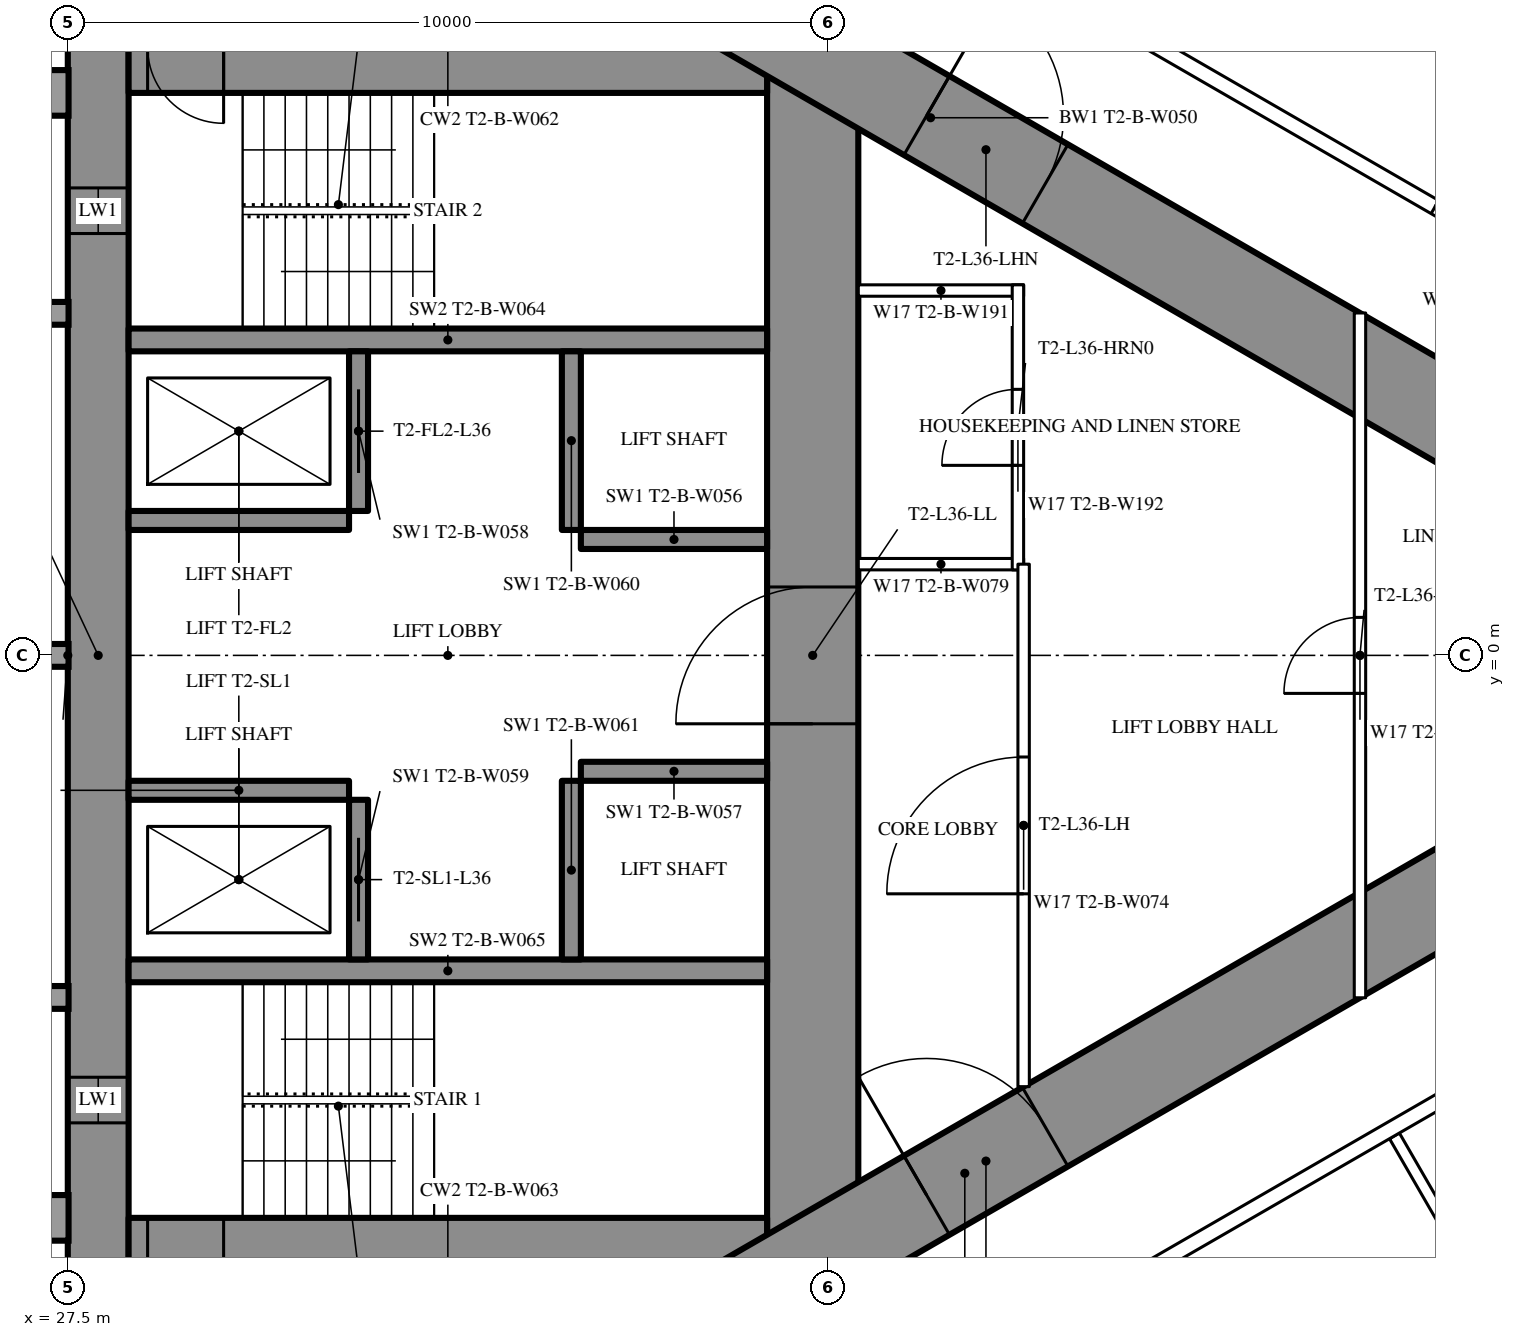
"""IFC4 building model, lengths in metres.
Left out: names, types, materials, properties, quantities, classifications, styles, units other than length and angle.
Written with IfcOpenShell. Run it as: python <this file> out.ifc"""

import sys

from ifc_helpers import new_model, si_unit, direction, frame, frame_2d, origin, place, context, subcontext, project, spatial, rectangle, extrude, element, fill, save


model = new_model("IFC4")
c1 = context("Model", 3, precision=1e-05, world=origin(), true_north=direction((0.0, 1.0)))
c2 = subcontext(c1, "Body", "Model", "MODEL_VIEW")
j1 = project(units=[si_unit("LENGTHUNIT", "METRE"), si_unit("PLANEANGLEUNIT", "RADIAN")], contexts=[c1])
p1 = place(None, origin())
s1 = spatial("IfcSite", under=j1, at=p1, CompositionType="ELEMENT")
p2 = place(p1, origin())
s2 = spatial("IfcBuilding", under=s1, at=p2, CompositionType="ELEMENT")
p3 = place(p2, frame((0.0, 0.0, 136.1)))
s3 = spatial("IfcBuildingStorey", under=s2, at=p3, CompositionType="ELEMENT", Elevation=136.1)
p4 = place(p3, frame((27.9, -8.6, 0.0), z_axis=(0.0, 0.0, 1.0), x_axis=(0.0, 1.0, 0.0)))
e1 = element("IfcWall", 1, at=p4, inside=s3, PredefinedType="SHEAR", context=c2, shape_type="SweptSolid", body=[
    extrude(rectangle(XDim=17.2, YDim=0.8, at=frame_2d((8.6, 0.0))), origin(), (0.0, 0.0, 1.0), 3.5),
])
p5 = place(p4, frame((2.45, 0.0, 0.6)))
e2 = element("IfcOpeningElement", 2, at=p5, cuts=e1, PredefinedType="OPENING", context=c2, shape_type="SweptSolid", body=[
    extrude(rectangle(XDim=0.6, YDim=2.1, at=frame_2d((0.3, 1.05))), frame((0.0, 0.41, 0.0), z_axis=(0.0, -1.0, 0.0), x_axis=(1.0, 0.0, 0.0)), (0.0, 0.0, 1.0), 0.82),
])
p6 = place(p4, frame((14.15, 0.0, 0.6)))
e3 = element("IfcOpeningElement", 3, at=p6, cuts=e1, PredefinedType="OPENING", context=c2, shape_type="SweptSolid", body=[
    extrude(rectangle(XDim=0.6, YDim=2.1, at=frame_2d((0.3, 1.05))), frame((0.0, 0.41, 0.0), z_axis=(0.0, -1.0, 0.0), x_axis=(1.0, 0.0, 0.0)), (0.0, 0.0, 1.0), 0.82),
])
p7 = place(p3, frame((37.3, -8.6, 0.0), z_axis=(0.0, 0.0, 1.0), x_axis=(0.0, 1.0, 0.0)))
e4 = element("IfcWall", 4, at=p7, inside=s3, PredefinedType="SHEAR", context=c2, shape_type="SweptSolid", body=[
    extrude(rectangle(XDim=17.2, YDim=1.2, at=frame_2d((8.6, 0.0))), origin(), (0.0, 0.0, 1.0), 3.5),
])
p8 = place(p7, frame((7.7, 0.0, 0.0)))
e5 = element("IfcOpeningElement", 5, at=p8, cuts=e4, PredefinedType="OPENING", context=c2, shape_type="SweptSolid", body=[
    extrude(rectangle(XDim=1.8, YDim=2.2, at=frame_2d((0.9, 1.1))), frame((0.0, 0.61, 0.0), z_axis=(0.0, -1.0, 0.0), x_axis=(1.0, 0.0, 0.0)), (0.0, 0.0, 1.0), 1.22),
])
p9 = place(p3, frame((28.3, -8.0, 0.0), z_axis=(0.0, 0.0, 1.0), x_axis=(1.0, 0.0, 0.0)))
e6 = element("IfcWall", 6, at=p9, inside=s3, PredefinedType="SHEAR", context=c2, shape_type="SweptSolid", body=[
    extrude(rectangle(XDim=8.4, YDim=1.2, at=frame_2d((4.2, 0.0))), origin(), (0.0, 0.0, 1.0), 3.5),
])
p10 = place(p9, frame((0.25, 0.0, 0.0)))
e7 = element("IfcOpeningElement", 7, at=p10, cuts=e6, PredefinedType="OPENING", context=c2, shape_type="SweptSolid", body=[
    extrude(rectangle(XDim=1.0, YDim=2.2, at=frame_2d((0.5, 1.1))), frame((0.0, 0.61, 0.0), z_axis=(0.0, -1.0, 0.0), x_axis=(1.0, 0.0, 0.0)), (0.0, 0.0, 1.0), 1.22),
])
p11 = place(p3, frame((28.3, 8.0, 0.0), z_axis=(0.0, 0.0, 1.0), x_axis=(1.0, 0.0, 0.0)))
e8 = element("IfcWall", 8, at=p11, inside=s3, PredefinedType="SHEAR", context=c2, shape_type="SweptSolid", body=[
    extrude(rectangle(XDim=8.4, YDim=1.2, at=frame_2d((4.2, 0.0))), origin(), (0.0, 0.0, 1.0), 3.5),
])
p12 = place(p11, frame((0.25, 0.0, 0.0)))
e9 = element("IfcOpeningElement", 9, at=p12, cuts=e8, PredefinedType="OPENING", context=c2, shape_type="SweptSolid", body=[
    extrude(rectangle(XDim=1.0, YDim=2.2, at=frame_2d((0.5, 1.1))), frame((0.0, 0.61, 0.0), z_axis=(0.0, -1.0, 0.0), x_axis=(1.0, 0.0, 0.0)), (0.0, 0.0, 1.0), 1.22),
])
for number, where, z_axis, x_axis in (
    (10, (28.3, -4.15, 0.0), (0.0, 0.0, 1.0), (1.0, 0.0, 0.0)),
    (11, (28.3, 4.15, 0.0), (0.0, 0.0, 1.0), (1.0, 0.0, 0.0)),
):
    element("IfcWall", number, at=place(p3, frame(where, z_axis=z_axis, x_axis=x_axis)), inside=s3, PredefinedType="SHEAR", context=c2, shape_type="SweptSolid", body=[
        extrude(rectangle(XDim=8.4, YDim=0.3, at=frame_2d((4.2, 0.0))), origin(), (0.0, 0.0, 1.0), 3.5),
    ])
p13 = place(p3, frame((31.325, -4.0, 0.0), z_axis=(0.0, 0.0, 1.0), x_axis=(0.0, 1.0, 0.0)))
e12 = element("IfcWall", 12, at=p13, inside=s3, PredefinedType="SHEAR", context=c2, shape_type="SweptSolid", body=[
    extrude(rectangle(XDim=2.1, YDim=0.25, at=frame_2d((1.05, 0.0))), origin(), (0.0, 0.0, 1.0), 3.5),
])
p14 = place(p13, frame((0.5, 0.0, 0.0)))
e13 = element("IfcOpeningElement", 13, at=p14, cuts=e12, PredefinedType="OPENING", context=c2, shape_type="SweptSolid", body=[
    extrude(rectangle(XDim=1.1, YDim=2.2, at=frame_2d((0.55, 1.1))), frame((0.0, 0.135, 0.0), z_axis=(0.0, -1.0, 0.0), x_axis=(1.0, 0.0, 0.0)), (0.0, 0.0, 1.0), 0.27),
])
p15 = place(p3, frame((34.125, -4.0, 0.0), z_axis=(0.0, 0.0, 1.0), x_axis=(0.0, 1.0, 0.0)))
e14 = element("IfcWall", 14, at=p15, inside=s3, PredefinedType="SHEAR", context=c2, shape_type="SweptSolid", body=[
    extrude(rectangle(XDim=2.35, YDim=0.25, at=frame_2d((1.175, 0.0))), origin(), (0.0, 0.0, 1.0), 3.5),
])
p16 = place(p3, frame((28.3, -1.775, 0.0), z_axis=(0.0, 0.0, 1.0), x_axis=(1.0, 0.0, 0.0)))
e15 = element("IfcWall", 15, at=p16, inside=s3, PredefinedType="SHEAR", context=c2, shape_type="SweptSolid", body=[
    extrude(rectangle(XDim=2.9, YDim=0.25, at=frame_2d((1.45, 0.0))), origin(), (0.0, 0.0, 1.0), 3.5),
])
p17 = place(p3, frame((34.25, -1.525, 0.0), z_axis=(0.0, 0.0, 1.0), x_axis=(1.0, 0.0, 0.0)))
e16 = element("IfcWall", 16, at=p17, inside=s3, PredefinedType="SHEAR", context=c2, shape_type="SweptSolid", body=[
    extrude(rectangle(XDim=2.45, YDim=0.25, at=frame_2d((1.225, 0.0))), origin(), (0.0, 0.0, 1.0), 3.5),
])
p18 = place(p3, frame((31.325, 1.9, 0.0), z_axis=(0.0, 0.0, 1.0), x_axis=(0.0, 1.0, 0.0)))
e17 = element("IfcWall", 17, at=p18, inside=s3, PredefinedType="SHEAR", context=c2, shape_type="SweptSolid", body=[
    extrude(rectangle(XDim=2.1, YDim=0.25, at=frame_2d((1.05, 0.0))), origin(), (0.0, 0.0, 1.0), 3.5),
])
p19 = place(p18, frame((0.5, 0.0, 0.0)))
e18 = element("IfcOpeningElement", 18, at=p19, cuts=e17, PredefinedType="OPENING", context=c2, shape_type="SweptSolid", body=[
    extrude(rectangle(XDim=1.1, YDim=2.2, at=frame_2d((0.55, 1.1))), frame((0.0, 0.135, 0.0), z_axis=(0.0, -1.0, 0.0), x_axis=(1.0, 0.0, 0.0)), (0.0, 0.0, 1.0), 0.27),
])
p20 = place(p3, frame((34.125, 1.65, 0.0), z_axis=(0.0, 0.0, 1.0), x_axis=(0.0, 1.0, 0.0)))
e19 = element("IfcWall", 19, at=p20, inside=s3, PredefinedType="SHEAR", context=c2, shape_type="SweptSolid", body=[
    extrude(rectangle(XDim=2.35, YDim=0.25, at=frame_2d((1.175, 0.0))), origin(), (0.0, 0.0, 1.0), 3.5),
])
p21 = place(p3, frame((28.3, 1.775, 0.0), z_axis=(0.0, 0.0, 1.0), x_axis=(1.0, 0.0, 0.0)))
e20 = element("IfcWall", 20, at=p21, inside=s3, PredefinedType="SHEAR", context=c2, shape_type="SweptSolid", body=[
    extrude(rectangle(XDim=2.9, YDim=0.25, at=frame_2d((1.45, 0.0))), origin(), (0.0, 0.0, 1.0), 3.5),
])
p22 = place(p3, frame((34.25, 1.525, 0.0), z_axis=(0.0, 0.0, 1.0), x_axis=(1.0, 0.0, 0.0)))
e21 = element("IfcWall", 21, at=p22, inside=s3, PredefinedType="SHEAR", context=c2, shape_type="SweptSolid", body=[
    extrude(rectangle(XDim=2.45, YDim=0.25, at=frame_2d((1.225, 0.0))), origin(), (0.0, 0.0, 1.0), 3.5),
])
p23 = place(p3, frame((27.2, -13.8, 0.0), z_axis=(0.0, 0.0, 1.0), x_axis=(0.866027159892, 0.499996958321, 0.0)))
e22 = element("IfcWall", 22, at=p23, inside=s3, PredefinedType="SHEAR", context=c2, shape_type="SweptSolid", body=[
    extrude(rectangle(XDim=27.947, YDim=1.2, at=frame_2d((13.973, 0.0))), origin(), (0.0, 0.0, 1.0), 3.5),
])
p24 = place(p23, frame((4.6, 0.0, 0.0)))
e23 = element("IfcOpeningElement", 23, at=p24, cuts=e22, PredefinedType="OPENING", context=c2, shape_type="SweptSolid", body=[
    extrude(rectangle(XDim=1.0, YDim=2.2, at=frame_2d((0.5, 1.1))), frame((0.0, 0.61, 0.0), z_axis=(0.0, -1.0, 0.0), x_axis=(1.0, 0.0, 0.0)), (0.0, 0.0, 1.0), 1.22),
])
p25 = place(p23, frame((13.395, 0.0, 0.0)))
e24 = element("IfcOpeningElement", 24, at=p25, cuts=e22, PredefinedType="OPENING", context=c2, shape_type="SweptSolid", body=[
    extrude(rectangle(XDim=1.8, YDim=2.2, at=frame_2d((0.9, 1.1))), frame((0.0, 0.61, 0.0), z_axis=(0.0, -1.0, 0.0), x_axis=(1.0, 0.0, 0.0)), (0.0, 0.0, 1.0), 1.22),
])
p26 = place(p3, frame((27.2, 13.8, 0.0), z_axis=(0.0, 0.0, 1.0), x_axis=(0.866024515034, -0.500001539357, 0.0)))
e25 = element("IfcWall", 25, at=p26, inside=s3, PredefinedType="SHEAR", context=c2, shape_type="SweptSolid", body=[
    extrude(rectangle(XDim=26.907, YDim=1.2, at=frame_2d((13.454, 0.0))), origin(), (0.0, 0.0, 1.0), 3.5),
])
p27 = place(p26, frame((4.6, 0.0, 0.0)))
e26 = element("IfcOpeningElement", 26, at=p27, cuts=e25, PredefinedType="OPENING", context=c2, shape_type="SweptSolid", body=[
    extrude(rectangle(XDim=1.0, YDim=2.2, at=frame_2d((0.5, 1.1))), frame((0.0, 0.61, 0.0), z_axis=(0.0, -1.0, 0.0), x_axis=(1.0, 0.0, 0.0)), (0.0, 0.0, 1.0), 1.22),
])
p28 = place(p26, frame((13.395, 0.0, 0.0)))
e27 = element("IfcOpeningElement", 27, at=p28, cuts=e25, PredefinedType="OPENING", context=c2, shape_type="SweptSolid", body=[
    extrude(rectangle(XDim=1.8, YDim=2.2, at=frame_2d((0.9, 1.1))), frame((0.0, 0.61, 0.0), z_axis=(0.0, -1.0, 0.0), x_axis=(1.0, 0.0, 0.0)), (0.0, 0.0, 1.0), 1.22),
])
p29 = place(p3, frame((44.954, -6.321, 0.0), z_axis=(0.0, 0.0, 1.0), x_axis=(0.500018676722, -0.866014620505, 0.0)))
e28 = element("IfcWall", 28, at=p29, inside=s3, PredefinedType="PARTITIONING", context=c2, shape_type="SweptSolid", body=[
    extrude(rectangle(XDim=8.704, YDim=0.15, at=frame_2d((4.352, 0.0))), origin(), (0.0, 0.0, 1.0), 2.2),
])
p30 = place(p3, frame((37.96, -10.243, 0.0), z_axis=(0.0, 0.0, 1.0), x_axis=(0.866026429433, 0.499998223521, 0.0)))
e29 = element("IfcWall", 29, at=p30, inside=s3, PredefinedType="PARTITIONING", context=c2, shape_type="SweptSolid", body=[
    extrude(rectangle(XDim=20.487, YDim=0.2, at=frame_2d((10.243, 0.0))), origin(), (0.0, 0.0, 1.0), 3.25),
])
p31 = place(p30, frame((10.743, 0.0, 0.0)))
e30 = element("IfcOpeningElement", 30, at=p31, cuts=e29, PredefinedType="OPENING", context=c2, shape_type="SweptSolid", body=[
    extrude(rectangle(XDim=0.95, YDim=2.2, at=frame_2d((0.475, 1.1))), frame((0.0, 0.11, 0.0), z_axis=(0.0, -1.0, 0.0), x_axis=(1.0, 0.0, 0.0)), (0.0, 0.0, 1.0), 0.22),
])
p32 = place(p30, frame((17.586, 0.0, 0.0)))
e31 = element("IfcOpeningElement", 31, at=p32, cuts=e29, PredefinedType="OPENING", context=c2, shape_type="SweptSolid", body=[
    extrude(rectangle(XDim=1.8, YDim=2.2, at=frame_2d((0.9, 1.1))), frame((0.0, 0.11, 0.0), z_axis=(0.0, -1.0, 0.0), x_axis=(1.0, 0.0, 0.0)), (0.0, 0.0, 1.0), 0.22),
])
p33 = place(p30, frame((0.6, 0.0, 0.0)))
e32 = element("IfcOpeningElement", 32, at=p33, cuts=e29, PredefinedType="OPENING", context=c2, shape_type="SweptSolid", body=[
    extrude(rectangle(XDim=0.95, YDim=2.2, at=frame_2d((0.475, 1.1))), frame((0.0, 0.11, 0.0), z_axis=(0.0, -1.0, 0.0), x_axis=(1.0, 0.0, 0.0)), (0.0, 0.0, 1.0), 0.22),
])
p34 = place(p3, frame((36.834, 10.894, 0.0), z_axis=(0.0, 0.0, 1.0), x_axis=(0.866028157229, -0.499995230863, 0.0)))
e33 = element("IfcWall", 33, at=p34, inside=s3, PredefinedType="PARTITIONING", context=c2, shape_type="SweptSolid", body=[
    extrude(rectangle(XDim=21.667, YDim=0.2, at=frame_2d((10.833, 0.0))), origin(), (0.0, 0.0, 1.0), 3.25),
])
p35 = place(p34, frame((20.117, 0.0, 0.0)))
e34 = element("IfcOpeningElement", 34, at=p35, cuts=e33, PredefinedType="OPENING", context=c2, shape_type="SweptSolid", body=[
    extrude(rectangle(XDim=0.95, YDim=2.2, at=frame_2d((0.475, 1.1))), frame((0.0, 0.11, 0.0), z_axis=(0.0, -1.0, 0.0), x_axis=(1.0, 0.0, 0.0)), (0.0, 0.0, 1.0), 0.22),
])
p36 = place(p34, frame((14.938, 0.0, 0.0)))
e35 = element("IfcOpeningElement", 35, at=p36, cuts=e33, PredefinedType="OPENING", context=c2, shape_type="SweptSolid", body=[
    extrude(rectangle(XDim=1.8, YDim=2.2, at=frame_2d((0.9, 1.1))), frame((0.0, 0.11, 0.0), z_axis=(0.0, -1.0, 0.0), x_axis=(1.0, 0.0, 0.0)), (0.0, 0.0, 1.0), 0.22),
])
p37 = place(p34, frame((9.99, 0.0, 0.0)))
e36 = element("IfcOpeningElement", 36, at=p37, cuts=e33, PredefinedType="OPENING", context=c2, shape_type="SweptSolid", body=[
    extrude(rectangle(XDim=0.95, YDim=2.2, at=frame_2d((0.475, 1.1))), frame((0.0, 0.11, 0.0), z_axis=(0.0, -1.0, 0.0), x_axis=(1.0, 0.0, 0.0)), (0.0, 0.0, 1.0), 0.22),
])
p38 = place(p34, frame((3.35, 0.0, 0.0)))
e37 = element("IfcOpeningElement", 37, at=p38, cuts=e33, PredefinedType="OPENING", context=c2, shape_type="SweptSolid", body=[
    extrude(rectangle(XDim=1.0, YDim=2.2, at=frame_2d((0.5, 1.1))), frame((0.0, 0.11, 0.0), z_axis=(0.0, -1.0, 0.0), x_axis=(1.0, 0.0, 0.0)), (0.0, 0.0, 1.0), 0.22),
])
for number, where, z_axis, x_axis in (
    (38, (37.9, 1.2, 0.0), (0.0, 0.0, 1.0), (1.0, 0.0, 0.0)),
    (39, (37.9, 4.8, 0.0), (0.0, 0.0, 1.0), (1.0, 0.0, 0.0)),
):
    element("IfcWall", number, at=place(p3, frame(where, z_axis=z_axis, x_axis=x_axis)), inside=s3, PredefinedType="PARTITIONING", context=c2, shape_type="SweptSolid", body=[
        extrude(rectangle(XDim=2.175, YDim=0.15, at=frame_2d((1.087, 0.0))), origin(), (0.0, 0.0, 1.0), 3.25),
    ])
p39 = place(p3, frame((40.0, 1.125, 0.0), z_axis=(0.0, 0.0, 1.0), x_axis=(0.0, 1.0, 0.0)))
e40 = element("IfcWall", 40, at=p39, inside=s3, PredefinedType="PARTITIONING", context=c2, shape_type="SweptSolid", body=[
    extrude(rectangle(XDim=3.75, YDim=0.15, at=frame_2d((1.875, 0.0))), origin(), (0.0, 0.0, 1.0), 3.25),
])
p40 = place(p39, frame((1.375, 0.0, 0.0)))
e41 = element("IfcOpeningElement", 41, at=p40, cuts=e40, PredefinedType="OPENING", context=c2, shape_type="SweptSolid", body=[
    extrude(rectangle(XDim=1.0, YDim=2.2, at=frame_2d((0.5, 1.1))), frame((0.0, 0.085, 0.0), z_axis=(0.0, -1.0, 0.0), x_axis=(1.0, 0.0, 0.0)), (0.0, 0.0, 1.0), 0.17),
])
p41 = place(p3, frame((40.075, -5.674, 0.0), z_axis=(0.0, 0.0, 1.0), x_axis=(0.0, 1.0, 0.0)))
e42 = element("IfcWall", 42, at=p41, inside=s3, PredefinedType="PARTITIONING", context=c2, shape_type="SweptSolid", body=[
    extrude(rectangle(XDim=6.874, YDim=0.15, at=frame_2d((3.437, 0.0))), origin(), (0.0, 0.0, 1.0), 3.25),
])
p42 = place(p41, frame((2.537, 0.0, 0.0)))
e43 = element("IfcOpeningElement", 43, at=p42, cuts=e42, PredefinedType="OPENING", context=c2, shape_type="SweptSolid", body=[
    extrude(rectangle(XDim=1.8, YDim=2.2, at=frame_2d((0.9, 1.1))), frame((0.0, 0.085, 0.0), z_axis=(0.0, -1.0, 0.0), x_axis=(1.0, 0.0, 0.0)), (0.0, 0.0, 1.0), 0.17),
])
p43 = place(p3, frame((44.5, -4.505, 0.0), z_axis=(0.0, 0.0, 1.0), x_axis=(0.0, 1.0, 0.0)))
e44 = element("IfcWall", 44, at=p43, inside=s3, PredefinedType="PARTITIONING", context=c2, shape_type="SweptSolid", body=[
    extrude(rectangle(XDim=9.009, YDim=0.15, at=frame_2d((4.505, 0.0))), origin(), (0.0, 0.0, 1.0), 2.45),
])
p44 = place(p43, frame((4.005, 0.0, 0.0)))
e45 = element("IfcOpeningElement", 45, at=p44, cuts=e44, PredefinedType="OPENING", context=c2, shape_type="SweptSolid", body=[
    extrude(rectangle(XDim=1.0, YDim=2.2, at=frame_2d((0.5, 1.1))), frame((0.0, 0.085, 0.0), z_axis=(0.0, -1.0, 0.0), x_axis=(1.0, 0.0, 0.0)), (0.0, 0.0, 1.0), 0.17),
])
p45 = place(p37, origin())
e46 = element("IfcDoor", 46, at=p45, inside=s3, OperationType="SINGLE_SWING_LEFT", PredefinedType="DOOR", context=c2, shape_type="SweptSolid", body=[
    extrude(rectangle(XDim=0.95, YDim=2.2, at=frame_2d((0.475, 1.1))), frame((0.0, 0.025, 0.0), z_axis=(0.0, -1.0, 0.0), x_axis=(1.0, 0.0, 0.0)), (0.0, 0.0, 1.0), 0.05),
])
fill(e36, e46)
p46 = place(p40, origin())
e47 = element("IfcDoor", 47, at=p46, inside=s3, OperationType="SINGLE_SWING_LEFT", PredefinedType="DOOR", context=c2, shape_type="SweptSolid", body=[
    extrude(rectangle(XDim=1.0, YDim=2.2, at=frame_2d((0.5, 1.1))), frame((0.0, 0.025, 0.0), z_axis=(0.0, -1.0, 0.0), x_axis=(1.0, 0.0, 0.0)), (0.0, 0.0, 1.0), 0.05),
])
fill(e41, e47)
p47 = place(p42, origin())
e48 = element("IfcDoor", 48, at=p47, inside=s3, OperationType="DOUBLE_DOOR_SINGLE_SWING", PredefinedType="DOOR", context=c2, shape_type="SweptSolid", body=[
    extrude(rectangle(XDim=1.8, YDim=2.2, at=frame_2d((0.9, 1.1))), frame((0.0, 0.025, 0.0), z_axis=(0.0, -1.0, 0.0), x_axis=(1.0, 0.0, 0.0)), (0.0, 0.0, 1.0), 0.05),
])
fill(e43, e48)
p48 = place(p44, origin())
e49 = element("IfcDoor", 49, at=p48, inside=s3, OperationType="SINGLE_SWING_LEFT", PredefinedType="DOOR", context=c2, shape_type="SweptSolid", body=[
    extrude(rectangle(XDim=1.0, YDim=2.2, at=frame_2d((0.5, 1.1))), frame((0.0, 0.025, 0.0), z_axis=(0.0, -1.0, 0.0), x_axis=(1.0, 0.0, 0.0)), (0.0, 0.0, 1.0), 0.05),
])
fill(e45, e49)
p49 = place(p25, origin())
e50 = element("IfcDoor", 50, at=p49, inside=s3, OperationType="DOUBLE_DOOR_SINGLE_SWING", PredefinedType="DOOR", context=c2, shape_type="SweptSolid", body=[
    extrude(rectangle(XDim=1.8, YDim=2.2, at=frame_2d((0.9, 1.1))), frame((0.0, 0.025, 0.0), z_axis=(0.0, -1.0, 0.0), x_axis=(1.0, 0.0, 0.0)), (0.0, 0.0, 1.0), 0.05),
])
fill(e24, e50)
p50 = place(p28, origin())
e51 = element("IfcDoor", 51, at=p50, inside=s3, OperationType="DOUBLE_DOOR_SINGLE_SWING", PredefinedType="DOOR", context=c2, shape_type="SweptSolid", body=[
    extrude(rectangle(XDim=1.8, YDim=2.2, at=frame_2d((0.9, 1.1))), frame((0.0, 0.025, 0.0), z_axis=(0.0, -1.0, 0.0), x_axis=(1.0, 0.0, 0.0)), (0.0, 0.0, 1.0), 0.05),
])
fill(e27, e51)
p51 = place(p8, origin())
e52 = element("IfcDoor", 52, at=p51, inside=s3, OperationType="DOUBLE_DOOR_SINGLE_SWING", PredefinedType="DOOR", context=c2, shape_type="SweptSolid", body=[
    extrude(rectangle(XDim=1.8, YDim=2.2, at=frame_2d((0.9, 1.1))), frame((0.0, 0.025, 0.0), z_axis=(0.0, -1.0, 0.0), x_axis=(1.0, 0.0, 0.0)), (0.0, 0.0, 1.0), 0.05),
])
fill(e5, e52)
p52 = place(p14, origin())
e53 = element("IfcDoor", 53, at=p52, inside=s3, OperationType="SLIDING_TO_LEFT", PredefinedType="USERDEFINED", context=c2, shape_type="SweptSolid", body=[
    extrude(rectangle(XDim=1.1, YDim=2.2, at=frame_2d((0.55, 1.1))), frame((0.0, 0.025, 0.0), z_axis=(0.0, -1.0, 0.0), x_axis=(1.0, 0.0, 0.0)), (0.0, 0.0, 1.0), 0.05),
])
fill(e13, e53)
p53 = place(p19, origin())
e54 = element("IfcDoor", 54, at=p53, inside=s3, OperationType="SLIDING_TO_LEFT", PredefinedType="USERDEFINED", context=c2, shape_type="SweptSolid", body=[
    extrude(rectangle(XDim=1.1, YDim=2.2, at=frame_2d((0.55, 1.1))), frame((0.0, 0.025, 0.0), z_axis=(0.0, -1.0, 0.0), x_axis=(1.0, 0.0, 0.0)), (0.0, 0.0, 1.0), 0.05),
])
fill(e18, e54)
p54 = place(p5, origin())
e55 = element("IfcWindow", 55, at=p54, inside=s3, PartitioningType="SINGLE_PANEL", PredefinedType="WINDOW", context=c2, shape_type="SweptSolid", body=[
    extrude(rectangle(XDim=0.6, YDim=2.1, at=frame_2d((0.3, 1.05))), frame((0.0, 0.03, 0.0), z_axis=(0.0, -1.0, 0.0), x_axis=(1.0, 0.0, 0.0)), (0.0, 0.0, 1.0), 0.06),
])
fill(e2, e55)
p55 = place(p6, origin())
e56 = element("IfcWindow", 56, at=p55, inside=s3, PartitioningType="SINGLE_PANEL", PredefinedType="WINDOW", context=c2, shape_type="SweptSolid", body=[
    extrude(rectangle(XDim=0.6, YDim=2.1, at=frame_2d((0.3, 1.05))), frame((0.0, 0.03, 0.0), z_axis=(0.0, -1.0, 0.0), x_axis=(1.0, 0.0, 0.0)), (0.0, 0.0, 1.0), 0.06),
])
fill(e3, e56)
save(model, sys.argv[1])
